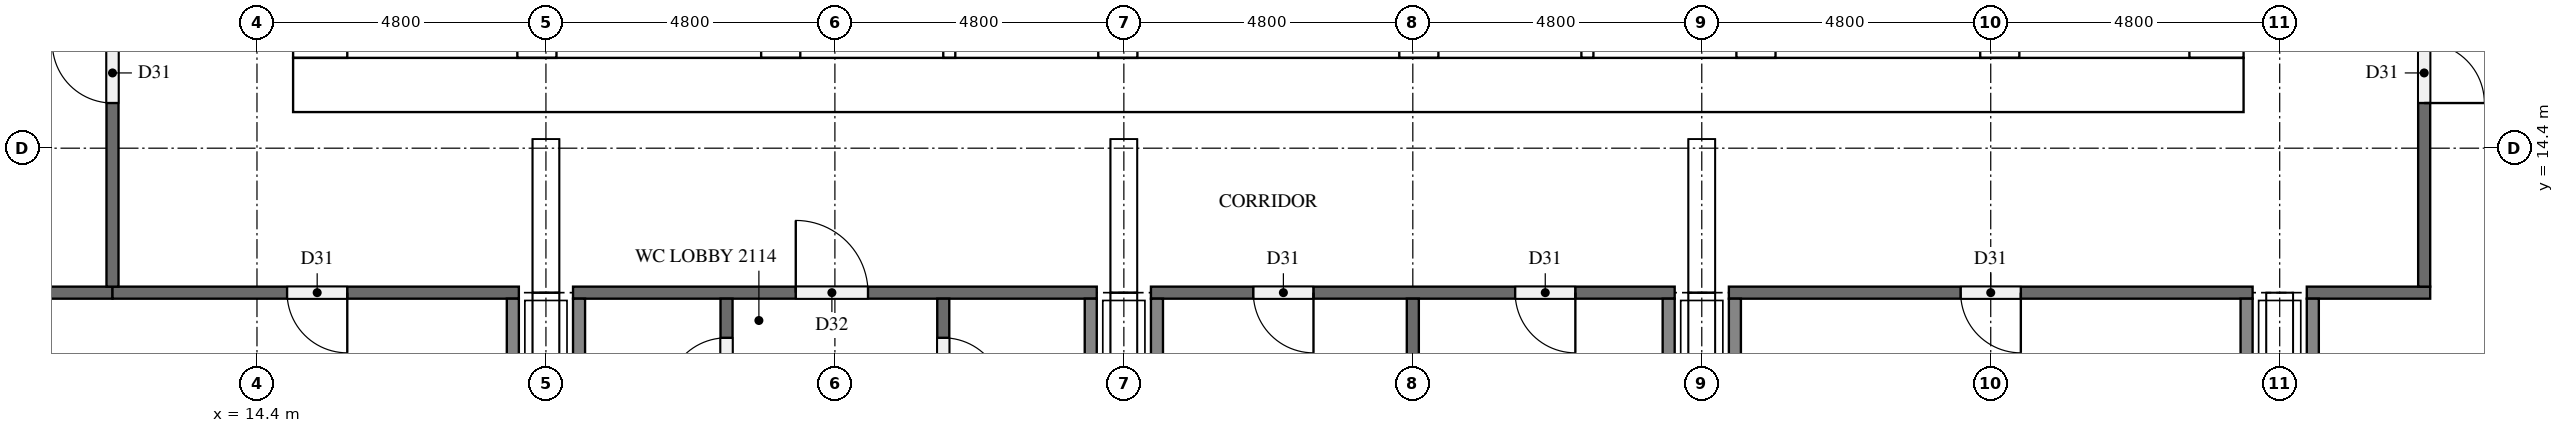
"""IFC4 building model, lengths in metres.
Left out: names, types, materials, properties, quantities, classifications, styles, units other than length and angle.
Written with IfcOpenShell. Run it as: python <this file> out.ifc"""

import sys

from ifc_helpers import new_model, si_unit, direction, frame, frame_2d, origin, place, context, subcontext, project, spatial, rectangle, extrude, element, fill, save


model = new_model("IFC4")
c1 = context("Model", 3, precision=1e-05, world=origin(), true_north=direction((0.0, 1.0)))
c2 = subcontext(c1, "Body", "Model", "MODEL_VIEW")
j1 = project(units=[si_unit("LENGTHUNIT", "METRE"), si_unit("PLANEANGLEUNIT", "RADIAN")], contexts=[c1])
p1 = place(None, origin())
s1 = spatial("IfcSite", under=j1, at=p1, CompositionType="ELEMENT")
p2 = place(p1, origin())
s2 = spatial("IfcBuilding", under=s1, at=p2, CompositionType="ELEMENT")
p3 = place(p2, frame((0.0, 0.0, 83.8)))
s3 = spatial("IfcBuildingStorey", under=s2, at=p3, CompositionType="ELEMENT", Elevation=83.8)
p4 = place(p3, frame((15.0, 15.45, 0.0), z_axis=(0.0, 0.0, 1.0), x_axis=(1.0, 0.0, 0.0)))
e1 = element("IfcWall", 1, at=p4, inside=s3, PredefinedType="SHEAR", context=c2, shape_type="SweptSolid", body=[
    extrude(rectangle(XDim=32.4, YDim=0.9, at=frame_2d((16.2, 0.0))), origin(), (0.0, 0.0, 1.0), 5.1),
])
p5 = place(p4, frame((15.3, 0.0, 0.0)))
e2 = element("IfcOpeningElement", 2, at=p5, cuts=e1, PredefinedType="OPENING", context=c2, shape_type="SweptSolid", body=[
    extrude(rectangle(XDim=1.8, YDim=2.1, at=frame_2d((0.9, 1.05))), frame((0.0, 0.46, 0.0), z_axis=(0.0, -1.0, 0.0), x_axis=(1.0, 0.0, 0.0)), (0.0, 0.0, 1.0), 0.92),
])
p6 = place(p3, frame((15.45, 15.9, 0.0), z_axis=(0.0, 0.0, 1.0), x_axis=(0.0, 1.0, 0.0)))
e3 = element("IfcWall", 3, at=p6, inside=s3, PredefinedType="SHEAR", context=c2, shape_type="SweptSolid", body=[
    extrude(rectangle(XDim=21.0, YDim=0.9, at=frame_2d((10.5, 0.0))), origin(), (0.0, 0.0, 1.0), 5.1),
])
p7 = place(p6, frame((4.86, 0.0, 0.0)))
e4 = element("IfcOpeningElement", 4, at=p7, cuts=e3, PredefinedType="OPENING", context=c2, shape_type="SweptSolid", body=[
    extrude(rectangle(XDim=1.2, YDim=2.1, at=frame_2d((0.6, 1.05))), frame((0.0, 0.46, 0.0), z_axis=(0.0, -1.0, 0.0), x_axis=(1.0, 0.0, 0.0)), (0.0, 0.0, 1.0), 0.92),
])
p8 = place(p3, frame((46.95, 15.9, 0.0), z_axis=(0.0, 0.0, 1.0), x_axis=(0.0, 1.0, 0.0)))
e5 = element("IfcWall", 5, at=p8, inside=s3, PredefinedType="SHEAR", context=c2, shape_type="SweptSolid", body=[
    extrude(rectangle(XDim=21.0, YDim=0.9, at=frame_2d((10.5, 0.0))), origin(), (0.0, 0.0, 1.0), 5.1),
])
p9 = place(p8, frame((10.2, 0.0, 0.0)))
e6 = element("IfcOpeningElement", 6, at=p9, cuts=e5, PredefinedType="OPENING", context=c2, shape_type="SweptSolid", body=[
    extrude(rectangle(XDim=1.2, YDim=2.1, at=frame_2d((0.6, 1.05))), frame((0.0, 0.46, 0.0), z_axis=(0.0, -1.0, 0.0), x_axis=(1.0, 0.0, 0.0)), (0.0, 0.0, 1.0), 0.92),
])
p10 = place(p3, frame((19.05, 15.9, 0.0), z_axis=(0.0, 0.0, 1.0), x_axis=(0.0, 1.0, 0.0)))
e7 = element("IfcWall", 7, at=p10, inside=s3, PredefinedType="SHEAR", context=c2, shape_type="SweptSolid", body=[
    extrude(rectangle(XDim=15.025, YDim=0.65, at=frame_2d((7.513, 0.0))), origin(), (0.0, 0.0, 1.0), 5.1),
])
p11 = place(p10, frame((9.55, 0.0, 0.0)))
e8 = element("IfcOpeningElement", 8, at=p11, cuts=e7, PredefinedType="OPENING", context=c2, shape_type="SweptSolid", body=[
    extrude(rectangle(XDim=1.1, YDim=2.1, at=frame_2d((0.55, 1.05))), frame((0.0, 0.335, 0.0), z_axis=(0.0, -1.0, 0.0), x_axis=(1.0, 0.0, 0.0)), (0.0, 0.0, 1.0), 0.67),
])
p12 = place(p10, frame((13.05, 0.0, 0.0)))
e9 = element("IfcOpeningElement", 9, at=p12, cuts=e7, PredefinedType="OPENING", context=c2, shape_type="SweptSolid", body=[
    extrude(rectangle(XDim=1.1, YDim=2.1, at=frame_2d((0.55, 1.05))), frame((0.0, 0.335, 0.0), z_axis=(0.0, -1.0, 0.0), x_axis=(1.0, 0.0, 0.0)), (0.0, 0.0, 1.0), 0.67),
])
p13 = place(p10, frame((0.3, 0.0, 0.0)))
e10 = element("IfcOpeningElement", 10, at=p13, cuts=e7, PredefinedType="OPENING", context=c2, shape_type="SweptSolid", body=[
    extrude(rectangle(XDim=1.2, YDim=2.1, at=frame_2d((0.6, 1.05))), frame((0.0, 0.335, 0.0), z_axis=(0.0, -1.0, 0.0), x_axis=(1.0, 0.0, 0.0)), (0.0, 0.0, 1.0), 0.67),
])
p14 = place(p3, frame((23.1, 15.9, 0.0), z_axis=(0.0, 0.0, 1.0), x_axis=(0.0, 1.0, 0.0)))
e11 = element("IfcWall", 11, at=p14, inside=s3, PredefinedType="SHEAR", context=c2, shape_type="SweptSolid", body=[
    extrude(rectangle(XDim=21.0, YDim=0.65, at=frame_2d((10.5, 0.0))), origin(), (0.0, 0.0, 1.0), 5.1),
])
p15 = place(p3, frame((39.3, 15.9, 0.0), z_axis=(0.0, 0.0, 1.0), x_axis=(0.0, 1.0, 0.0)))
e12 = element("IfcWall", 12, at=p15, inside=s3, PredefinedType="SHEAR", context=c2, shape_type="SweptSolid", body=[
    extrude(rectangle(XDim=8.35, YDim=0.65, at=frame_2d((4.175, 0.0))), origin(), (0.0, 0.0, 1.0), 5.1),
])
p16 = place(p3, frame((43.35, 15.9, 0.0), z_axis=(0.0, 0.0, 1.0), x_axis=(0.0, 1.0, 0.0)))
e13 = element("IfcWall", 13, at=p16, inside=s3, PredefinedType="SHEAR", context=c2, shape_type="SweptSolid", body=[
    extrude(rectangle(XDim=8.35, YDim=0.65, at=frame_2d((4.175, 0.0))), origin(), (0.0, 0.0, 1.0), 5.1),
])
p17 = place(p16, frame((0.3, 0.0, 0.0)))
e14 = element("IfcOpeningElement", 14, at=p17, cuts=e13, PredefinedType="OPENING", context=c2, shape_type="SweptSolid", body=[
    extrude(rectangle(XDim=1.2, YDim=2.1, at=frame_2d((0.6, 1.05))), frame((0.0, 0.335, 0.0), z_axis=(0.0, -1.0, 0.0), x_axis=(1.0, 0.0, 0.0)), (0.0, 0.0, 1.0), 0.67),
])
for number, where, z_axis, x_axis in (
    (15, (28.7, 15.9, 0.0), (0.0, 0.0, 1.0), (0.0, 1.0, 0.0)),
    (16, (33.7, 15.9, 0.0), (0.0, 0.0, 1.0), (0.0, 1.0, 0.0)),
):
    element("IfcWall", number, at=place(p3, frame(where, z_axis=z_axis, x_axis=x_axis)), inside=s3, PredefinedType="SHEAR", context=c2, shape_type="SweptSolid", body=[
        extrude(rectangle(XDim=2.525, YDim=0.65, at=frame_2d((1.263, 0.0))), origin(), (0.0, 0.0, 1.0), 5.1),
    ])
for number, where, z_axis, x_axis in (
    (17, (25.9, 15.9, 0.0), (0.0, 0.0, 1.0), (0.0, 1.0, 0.0)),
    (18, (36.5, 15.9, 0.0), (0.0, 0.0, 1.0), (0.0, 1.0, 0.0)),
):
    element("IfcWall", number, at=place(p3, frame(where, z_axis=z_axis, x_axis=x_axis)), inside=s3, PredefinedType="SOLIDWALL", context=c2, shape_type="SweptSolid", body=[
        extrude(rectangle(XDim=2.525, YDim=0.2, at=frame_2d((1.263, 0.0))), origin(), (0.0, 0.0, 1.0), 5.1),
    ])
p18 = place(p3, frame((10.25, 12.0, 0.0), z_axis=(0.0, 0.0, 1.0), x_axis=(1.0, 0.0, 0.0)))
e19 = element("IfcWall", 19, at=p18, inside=s3, PredefinedType="PARTITIONING", context=c2, shape_type="SweptSolid", body=[
    extrude(rectangle(XDim=1.75, YDim=0.2, at=frame_2d((0.875, 0.0))), origin(), (0.0, 0.0, 1.0), 5.1),
])
p19 = place(p3, frame((18.75, 12.0, 0.0), z_axis=(0.0, 0.0, 1.0), x_axis=(-1.0, 0.0, 0.0)))
e20 = element("IfcWall", 20, at=p19, inside=s3, PredefinedType="PARTITIONING", context=c2, shape_type="SweptSolid", body=[
    extrude(rectangle(XDim=6.75, YDim=0.2, at=frame_2d((3.375, 0.0))), origin(), (0.0, 0.0, 1.0), 5.1),
])
p20 = place(p19, frame((2.85, 0.0, 0.0)))
e21 = element("IfcOpeningElement", 21, at=p20, cuts=e20, PredefinedType="OPENING", context=c2, shape_type="SweptSolid", body=[
    extrude(rectangle(XDim=1.0, YDim=2.1, at=frame_2d((0.5, 1.05))), frame((0.0, 0.11, 0.0), z_axis=(0.0, -1.0, 0.0), x_axis=(1.0, 0.0, 0.0)), (0.0, 0.0, 1.0), 0.22),
])
p21 = place(p3, frame((19.65, 12.0, 0.0), z_axis=(0.0, 0.0, 1.0), x_axis=(1.0, 0.0, 0.0)))
e22 = element("IfcWall", 22, at=p21, inside=s3, PredefinedType="PARTITIONING", context=c2, shape_type="SweptSolid", body=[
    extrude(rectangle(XDim=8.7, YDim=0.2, at=frame_2d((4.35, 0.0))), origin(), (0.0, 0.0, 1.0), 5.1),
])
p22 = place(p21, frame((3.7, 0.0, 0.0)))
e23 = element("IfcOpeningElement", 23, at=p22, cuts=e22, PredefinedType="OPENING", context=c2, shape_type="SweptSolid", body=[
    extrude(rectangle(XDim=1.2, YDim=2.1, at=frame_2d((0.6, 1.05))), frame((0.0, 0.11, 0.0), z_axis=(0.0, -1.0, 0.0), x_axis=(1.0, 0.0, 0.0)), (0.0, 0.0, 1.0), 0.22),
])
p23 = place(p3, frame((37.95, 12.0, 0.0), z_axis=(0.0, 0.0, 1.0), x_axis=(-1.0, 0.0, 0.0)))
e24 = element("IfcWall", 24, at=p23, inside=s3, PredefinedType="PARTITIONING", context=c2, shape_type="SweptSolid", body=[
    extrude(rectangle(XDim=8.7, YDim=0.2, at=frame_2d((4.35, 0.0))), origin(), (0.0, 0.0, 1.0), 5.1),
])
p24 = place(p23, frame((6.0, 0.0, 0.0)))
e25 = element("IfcOpeningElement", 25, at=p24, cuts=e24, PredefinedType="OPENING", context=c2, shape_type="SweptSolid", body=[
    extrude(rectangle(XDim=1.0, YDim=2.1, at=frame_2d((0.5, 1.05))), frame((0.0, 0.11, 0.0), z_axis=(0.0, -1.0, 0.0), x_axis=(1.0, 0.0, 0.0)), (0.0, 0.0, 1.0), 0.22),
])
p25 = place(p23, frame((1.65, 0.0, 0.0)))
e26 = element("IfcOpeningElement", 26, at=p25, cuts=e24, PredefinedType="OPENING", context=c2, shape_type="SweptSolid", body=[
    extrude(rectangle(XDim=1.0, YDim=2.1, at=frame_2d((0.5, 1.05))), frame((0.0, 0.11, 0.0), z_axis=(0.0, -1.0, 0.0), x_axis=(1.0, 0.0, 0.0)), (0.0, 0.0, 1.0), 0.22),
])
p26 = place(p3, frame((47.55, 12.0, 0.0), z_axis=(0.0, 0.0, 1.0), x_axis=(-1.0, 0.0, 0.0)))
e27 = element("IfcWall", 27, at=p26, inside=s3, PredefinedType="PARTITIONING", context=c2, shape_type="SweptSolid", body=[
    extrude(rectangle(XDim=8.7, YDim=0.2, at=frame_2d((4.35, 0.0))), origin(), (0.0, 0.0, 1.0), 5.1),
])
p27 = place(p26, frame((3.85, 0.0, 0.0)))
e28 = element("IfcOpeningElement", 28, at=p27, cuts=e27, PredefinedType="OPENING", context=c2, shape_type="SweptSolid", body=[
    extrude(rectangle(XDim=1.0, YDim=2.1, at=frame_2d((0.5, 1.05))), frame((0.0, 0.11, 0.0), z_axis=(0.0, -1.0, 0.0), x_axis=(1.0, 0.0, 0.0)), (0.0, 0.0, 1.0), 0.22),
])
p28 = place(p3, frame((48.45, 12.0, 0.0), z_axis=(0.0, 0.0, 1.0), x_axis=(1.0, 0.0, 0.0)))
e29 = element("IfcWall", 29, at=p28, inside=s3, PredefinedType="PARTITIONING", context=c2, shape_type="SweptSolid", body=[
    extrude(rectangle(XDim=2.05, YDim=0.2, at=frame_2d((1.025, 0.0))), origin(), (0.0, 0.0, 1.0), 5.1),
])
p29 = place(p3, frame((12.0, 12.1, 0.0), z_axis=(0.0, 0.0, 1.0), x_axis=(0.0, 1.0, 0.0)))
e30 = element("IfcWall", 30, at=p29, inside=s3, PredefinedType="PARTITIONING", context=c2, shape_type="SweptSolid", body=[
    extrude(rectangle(XDim=28.6, YDim=0.2, at=frame_2d((14.3, 0.0))), origin(), (0.0, 0.0, 1.0), 5.1),
])
p30 = place(p29, frame((3.05, 0.0, 0.0)))
e31 = element("IfcOpeningElement", 31, at=p30, cuts=e30, PredefinedType="OPENING", context=c2, shape_type="SweptSolid", body=[
    extrude(rectangle(XDim=1.0, YDim=2.1, at=frame_2d((0.5, 1.05))), frame((0.0, 0.11, 0.0), z_axis=(0.0, -1.0, 0.0), x_axis=(1.0, 0.0, 0.0)), (0.0, 0.0, 1.0), 0.22),
])
p31 = place(p29, frame((9.05, 0.0, 0.0)))
e32 = element("IfcOpeningElement", 32, at=p31, cuts=e30, PredefinedType="OPENING", context=c2, shape_type="SweptSolid", body=[
    extrude(rectangle(XDim=1.0, YDim=2.1, at=frame_2d((0.5, 1.05))), frame((0.0, 0.11, 0.0), z_axis=(0.0, -1.0, 0.0), x_axis=(1.0, 0.0, 0.0)), (0.0, 0.0, 1.0), 0.22),
])
p32 = place(p29, frame((13.85, 0.0, 0.0)))
e33 = element("IfcOpeningElement", 33, at=p32, cuts=e30, PredefinedType="OPENING", context=c2, shape_type="SweptSolid", body=[
    extrude(rectangle(XDim=1.0, YDim=2.1, at=frame_2d((0.5, 1.05))), frame((0.0, 0.11, 0.0), z_axis=(0.0, -1.0, 0.0), x_axis=(1.0, 0.0, 0.0)), (0.0, 0.0, 1.0), 0.22),
])
p33 = place(p29, frame((18.65, 0.0, 0.0)))
e34 = element("IfcOpeningElement", 34, at=p33, cuts=e30, PredefinedType="OPENING", context=c2, shape_type="SweptSolid", body=[
    extrude(rectangle(XDim=1.0, YDim=2.1, at=frame_2d((0.5, 1.05))), frame((0.0, 0.11, 0.0), z_axis=(0.0, -1.0, 0.0), x_axis=(1.0, 0.0, 0.0)), (0.0, 0.0, 1.0), 0.22),
])
p34 = place(p29, frame((24.55, 0.0, 0.0)))
e35 = element("IfcOpeningElement", 35, at=p34, cuts=e30, PredefinedType="OPENING", context=c2, shape_type="SweptSolid", body=[
    extrude(rectangle(XDim=1.0, YDim=2.1, at=frame_2d((0.5, 1.05))), frame((0.0, 0.11, 0.0), z_axis=(0.0, -1.0, 0.0), x_axis=(1.0, 0.0, 0.0)), (0.0, 0.0, 1.0), 0.22),
])
for number, where, z_axis, x_axis in (
    (36, (18.65, 7.1, 0.0), (0.0, 0.0, 1.0), (0.0, 1.0, 0.0)),
    (37, (19.75, 7.1, 0.0), (0.0, 0.0, 1.0), (0.0, 1.0, 0.0)),
):
    element("IfcWall", number, at=place(p3, frame(where, z_axis=z_axis, x_axis=x_axis)), inside=s3, PredefinedType="PARTITIONING", context=c2, shape_type="SweptSolid", body=[
        extrude(rectangle(XDim=4.8, YDim=0.2, at=frame_2d((2.4, 0.0))), origin(), (0.0, 0.0, 1.0), 5.1),
    ])
p35 = place(p3, frame((22.2, 7.1, 0.0), z_axis=(0.0, 0.0, 1.0), x_axis=(0.0, 1.0, 0.0)))
e38 = element("IfcWall", 38, at=p35, inside=s3, PredefinedType="PARTITIONING", context=c2, shape_type="SweptSolid", body=[
    extrude(rectangle(XDim=4.8, YDim=0.2, at=frame_2d((2.4, 0.0))), origin(), (0.0, 0.0, 1.0), 5.1),
])
p36 = place(p35, frame((3.15, 0.0, 0.0)))
e39 = element("IfcOpeningElement", 39, at=p36, cuts=e38, PredefinedType="OPENING", context=c2, shape_type="SweptSolid", body=[
    extrude(rectangle(XDim=1.0, YDim=2.1, at=frame_2d((0.5, 1.05))), frame((0.0, 0.11, 0.0), z_axis=(0.0, -1.0, 0.0), x_axis=(1.0, 0.0, 0.0)), (0.0, 0.0, 1.0), 0.22),
])
p37 = place(p3, frame((25.8, 11.9, 0.0), z_axis=(0.0, 0.0, 1.0), x_axis=(0.0, -1.0, 0.0)))
e40 = element("IfcWall", 40, at=p37, inside=s3, PredefinedType="PARTITIONING", context=c2, shape_type="SweptSolid", body=[
    extrude(rectangle(XDim=4.8, YDim=0.2, at=frame_2d((2.4, 0.0))), origin(), (0.0, 0.0, 1.0), 5.1),
])
p38 = place(p37, frame((0.65, 0.0, 0.0)))
e41 = element("IfcOpeningElement", 41, at=p38, cuts=e40, PredefinedType="OPENING", context=c2, shape_type="SweptSolid", body=[
    extrude(rectangle(XDim=1.0, YDim=2.1, at=frame_2d((0.5, 1.05))), frame((0.0, 0.11, 0.0), z_axis=(0.0, -1.0, 0.0), x_axis=(1.0, 0.0, 0.0)), (0.0, 0.0, 1.0), 0.22),
])
for number, where, z_axis, x_axis in (
    (42, (28.25, 7.1, 0.0), (0.0, 0.0, 1.0), (0.0, 1.0, 0.0)),
    (43, (29.35, 7.1, 0.0), (0.0, 0.0, 1.0), (0.0, 1.0, 0.0)),
    (44, (33.6, 7.1, 0.0), (0.0, 0.0, 1.0), (0.0, 1.0, 0.0)),
    (45, (37.85, 7.1, 0.0), (0.0, 0.0, 1.0), (0.0, 1.0, 0.0)),
    (46, (38.95, 7.1, 0.0), (0.0, 0.0, 1.0), (0.0, 1.0, 0.0)),
    (47, (47.45, 7.1, 0.0), (0.0, 0.0, 1.0), (0.0, 1.0, 0.0)),
    (48, (48.55, 7.1, 0.0), (0.0, 0.0, 1.0), (0.0, 1.0, 0.0)),
):
    element("IfcWall", number, at=place(p3, frame(where, z_axis=z_axis, x_axis=x_axis)), inside=s3, PredefinedType="PARTITIONING", context=c2, shape_type="SweptSolid", body=[
        extrude(rectangle(XDim=4.8, YDim=0.2, at=frame_2d((2.4, 0.0))), origin(), (0.0, 0.0, 1.0), 5.1),
    ])
p39 = place(p3, frame((50.4, 40.7, 0.0), z_axis=(0.0, 0.0, 1.0), x_axis=(0.0, -1.0, 0.0)))
e49 = element("IfcWall", 49, at=p39, inside=s3, PredefinedType="PARTITIONING", context=c2, shape_type="SweptSolid", body=[
    extrude(rectangle(XDim=28.6, YDim=0.2, at=frame_2d((14.3, 0.0))), origin(), (0.0, 0.0, 1.0), 5.1),
])
p40 = place(p39, frame((24.55, 0.0, 0.0)))
e50 = element("IfcOpeningElement", 50, at=p40, cuts=e49, PredefinedType="OPENING", context=c2, shape_type="SweptSolid", body=[
    extrude(rectangle(XDim=1.0, YDim=2.1, at=frame_2d((0.5, 1.05))), frame((0.0, 0.11, 0.0), z_axis=(0.0, -1.0, 0.0), x_axis=(1.0, 0.0, 0.0)), (0.0, 0.0, 1.0), 0.22),
])
p41 = place(p39, frame((18.65, 0.0, 0.0)))
e51 = element("IfcOpeningElement", 51, at=p41, cuts=e49, PredefinedType="OPENING", context=c2, shape_type="SweptSolid", body=[
    extrude(rectangle(XDim=1.0, YDim=2.1, at=frame_2d((0.5, 1.05))), frame((0.0, 0.11, 0.0), z_axis=(0.0, -1.0, 0.0), x_axis=(1.0, 0.0, 0.0)), (0.0, 0.0, 1.0), 0.22),
])
p42 = place(p39, frame((13.85, 0.0, 0.0)))
e52 = element("IfcOpeningElement", 52, at=p42, cuts=e49, PredefinedType="OPENING", context=c2, shape_type="SweptSolid", body=[
    extrude(rectangle(XDim=1.0, YDim=2.1, at=frame_2d((0.5, 1.05))), frame((0.0, 0.11, 0.0), z_axis=(0.0, -1.0, 0.0), x_axis=(1.0, 0.0, 0.0)), (0.0, 0.0, 1.0), 0.22),
])
p43 = place(p39, frame((9.05, 0.0, 0.0)))
e53 = element("IfcOpeningElement", 53, at=p43, cuts=e49, PredefinedType="OPENING", context=c2, shape_type="SweptSolid", body=[
    extrude(rectangle(XDim=1.0, YDim=2.1, at=frame_2d((0.5, 1.05))), frame((0.0, 0.11, 0.0), z_axis=(0.0, -1.0, 0.0), x_axis=(1.0, 0.0, 0.0)), (0.0, 0.0, 1.0), 0.22),
])
p44 = place(p39, frame((3.05, 0.0, 0.0)))
e54 = element("IfcOpeningElement", 54, at=p44, cuts=e49, PredefinedType="OPENING", context=c2, shape_type="SweptSolid", body=[
    extrude(rectangle(XDim=1.0, YDim=2.1, at=frame_2d((0.5, 1.05))), frame((0.0, 0.11, 0.0), z_axis=(0.0, -1.0, 0.0), x_axis=(1.0, 0.0, 0.0)), (0.0, 0.0, 1.0), 0.22),
])
p45 = place(p5, frame((1.8, 0.0, 0.0), z_axis=(0.0, 0.0, 1.0), x_axis=(-1.0, 0.0, 0.0)))
e55 = element("IfcDoor", 55, at=p45, inside=s3, OperationType="DOUBLE_DOOR_SINGLE_SWING", PredefinedType="DOOR", context=c2, shape_type="SweptSolid", body=[
    extrude(rectangle(XDim=1.8, YDim=2.1, at=frame_2d((0.9, 1.05))), frame((0.0, 0.025, 0.0), z_axis=(0.0, -1.0, 0.0), x_axis=(1.0, 0.0, 0.0)), (0.0, 0.0, 1.0), 0.05),
])
fill(e2, e55)
p46 = place(p40, origin())
e56 = element("IfcDoor", 56, at=p46, inside=s3, OperationType="SINGLE_SWING_RIGHT", PredefinedType="DOOR", context=c2, shape_type="SweptSolid", body=[
    extrude(rectangle(XDim=1.0, YDim=2.1, at=frame_2d((0.5, 1.05))), frame((0.0, 0.025, 0.0), z_axis=(0.0, -1.0, 0.0), x_axis=(1.0, 0.0, 0.0)), (0.0, 0.0, 1.0), 0.05),
])
fill(e50, e56)
p47 = place(p20, origin())
e57 = element("IfcDoor", 57, at=p47, inside=s3, OperationType="SINGLE_SWING_LEFT", PredefinedType="DOOR", context=c2, shape_type="SweptSolid", body=[
    extrude(rectangle(XDim=1.0, YDim=2.1, at=frame_2d((0.5, 1.05))), frame((0.0, 0.025, 0.0), z_axis=(0.0, -1.0, 0.0), x_axis=(1.0, 0.0, 0.0)), (0.0, 0.0, 1.0), 0.05),
])
fill(e21, e57)
p48 = place(p22, origin())
e58 = element("IfcDoor", 58, at=p48, inside=s3, OperationType="SINGLE_SWING_LEFT", PredefinedType="DOOR", context=c2, shape_type="SweptSolid", body=[
    extrude(rectangle(XDim=1.2, YDim=2.1, at=frame_2d((0.6, 1.05))), frame((0.0, 0.025, 0.0), z_axis=(0.0, -1.0, 0.0), x_axis=(1.0, 0.0, 0.0)), (0.0, 0.0, 1.0), 0.05),
])
fill(e23, e58)
p49 = place(p36, origin())
e59 = element("IfcDoor", 59, at=p49, inside=s3, OperationType="SINGLE_SWING_LEFT", PredefinedType="DOOR", context=c2, shape_type="SweptSolid", body=[
    extrude(rectangle(XDim=1.0, YDim=2.1, at=frame_2d((0.5, 1.05))), frame((0.0, 0.025, 0.0), z_axis=(0.0, -1.0, 0.0), x_axis=(1.0, 0.0, 0.0)), (0.0, 0.0, 1.0), 0.05),
])
fill(e39, e59)
p50 = place(p38, origin())
e60 = element("IfcDoor", 60, at=p50, inside=s3, OperationType="SINGLE_SWING_RIGHT", PredefinedType="DOOR", context=c2, shape_type="SweptSolid", body=[
    extrude(rectangle(XDim=1.0, YDim=2.1, at=frame_2d((0.5, 1.05))), frame((0.0, 0.025, 0.0), z_axis=(0.0, -1.0, 0.0), x_axis=(1.0, 0.0, 0.0)), (0.0, 0.0, 1.0), 0.05),
])
fill(e41, e60)
p51 = place(p24, origin())
e61 = element("IfcDoor", 61, at=p51, inside=s3, OperationType="SINGLE_SWING_LEFT", PredefinedType="DOOR", context=c2, shape_type="SweptSolid", body=[
    extrude(rectangle(XDim=1.0, YDim=2.1, at=frame_2d((0.5, 1.05))), frame((0.0, 0.025, 0.0), z_axis=(0.0, -1.0, 0.0), x_axis=(1.0, 0.0, 0.0)), (0.0, 0.0, 1.0), 0.05),
])
fill(e25, e61)
p52 = place(p25, origin())
e62 = element("IfcDoor", 62, at=p52, inside=s3, OperationType="SINGLE_SWING_LEFT", PredefinedType="DOOR", context=c2, shape_type="SweptSolid", body=[
    extrude(rectangle(XDim=1.0, YDim=2.1, at=frame_2d((0.5, 1.05))), frame((0.0, 0.025, 0.0), z_axis=(0.0, -1.0, 0.0), x_axis=(1.0, 0.0, 0.0)), (0.0, 0.0, 1.0), 0.05),
])
fill(e26, e62)
p53 = place(p27, origin())
e63 = element("IfcDoor", 63, at=p53, inside=s3, OperationType="SINGLE_SWING_LEFT", PredefinedType="DOOR", context=c2, shape_type="SweptSolid", body=[
    extrude(rectangle(XDim=1.0, YDim=2.1, at=frame_2d((0.5, 1.05))), frame((0.0, 0.025, 0.0), z_axis=(0.0, -1.0, 0.0), x_axis=(1.0, 0.0, 0.0)), (0.0, 0.0, 1.0), 0.05),
])
fill(e28, e63)
p54 = place(p30, origin())
e64 = element("IfcDoor", 64, at=p54, inside=s3, OperationType="SINGLE_SWING_RIGHT", PredefinedType="DOOR", context=c2, shape_type="SweptSolid", body=[
    extrude(rectangle(XDim=1.0, YDim=2.1, at=frame_2d((0.5, 1.05))), frame((0.0, 0.025, 0.0), z_axis=(0.0, -1.0, 0.0), x_axis=(1.0, 0.0, 0.0)), (0.0, 0.0, 1.0), 0.05),
])
fill(e31, e64)
save(model, sys.argv[1])
